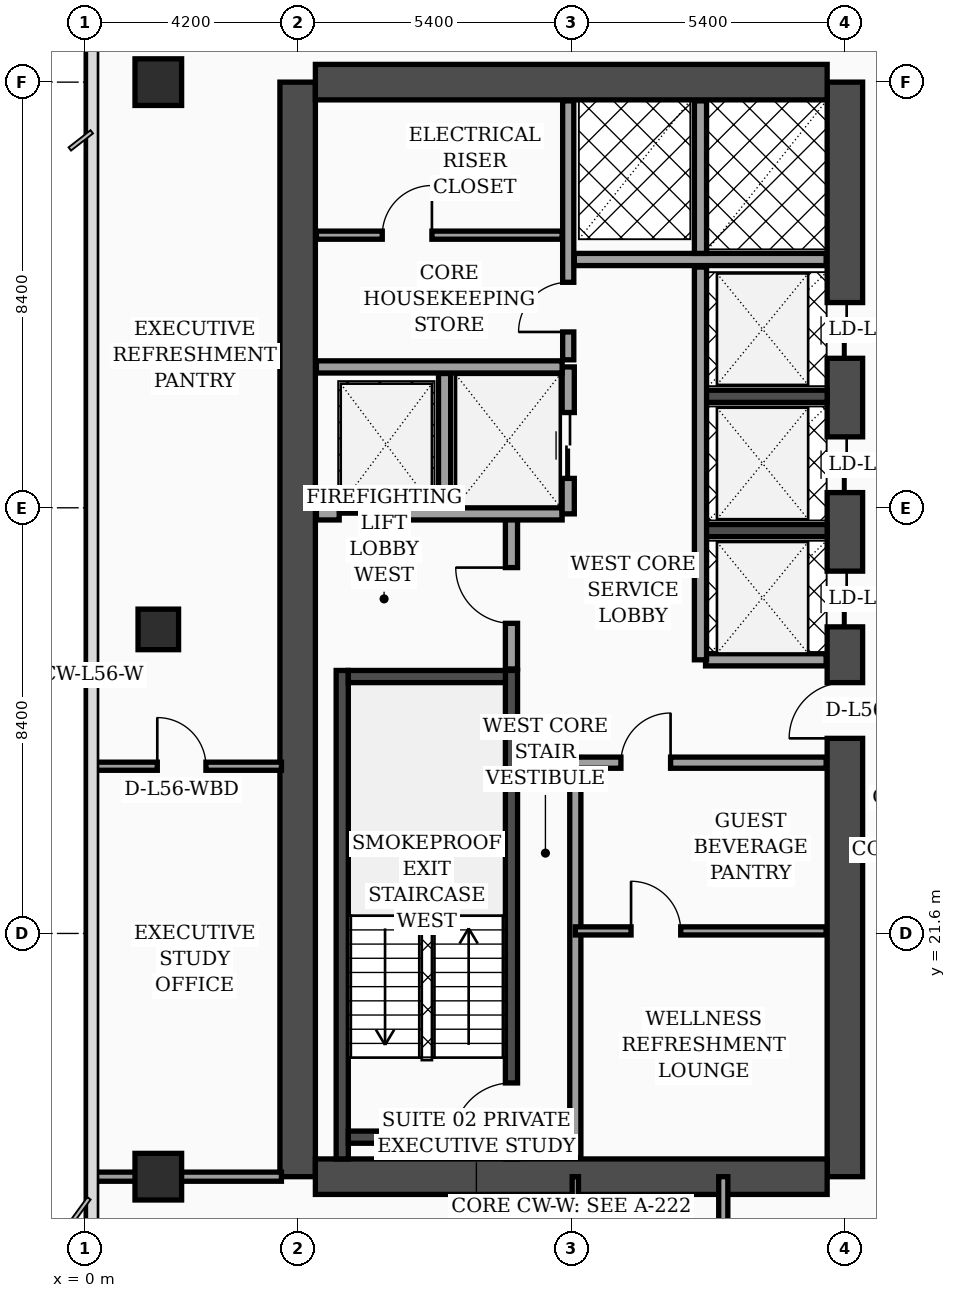
"""IFC4 building model, lengths in metres.
Left out: names, types, materials, properties, quantities, classifications, styles, units other than length and angle.
Written with IfcOpenShell. Run it as: python <this file> out.ifc"""

import sys

from ifc_helpers import new_model, si_unit, direction, frame, frame_2d, origin, origin_2d, place, context, subcontext, project, spatial, rectangle, extrude, element, fill, save


model = new_model("IFC4")
c1 = context("Model", 3, precision=1e-05, world=origin(), true_north=direction((0.0, 1.0)))
c2 = subcontext(c1, "Body", "Model", "MODEL_VIEW")
j1 = project(units=[si_unit("LENGTHUNIT", "METRE"), si_unit("PLANEANGLEUNIT", "RADIAN")], contexts=[c1])
p1 = place(None, origin())
s1 = spatial("IfcSite", under=j1, at=p1, CompositionType="ELEMENT")
p2 = place(p1, origin())
s2 = spatial("IfcBuilding", under=s1, at=p2, CompositionType="ELEMENT")
p3 = place(p2, frame((0.0, 0.0, 226.9)))
s3 = spatial("IfcBuildingStorey", under=s2, at=p3, CompositionType="ELEMENT", Elevation=226.9)
p4 = place(p3, frame((4.2, 16.8, 0.0), z_axis=(0.0, 0.0, 1.0), x_axis=(0.0, 1.0, 0.0)))
e1 = element("IfcWall", 1, at=p4, inside=s3, PredefinedType="SHEAR", context=c2, shape_type="SweptSolid", body=[
    extrude(rectangle(XDim=21.6, YDim=0.7, at=frame_2d((10.8, 0.0))), origin(), (0.0, 0.0, 1.0), 3.56),
])
p5 = place(p3, frame((15.0, 16.8, 0.0), z_axis=(0.0, 0.0, 1.0), x_axis=(0.0, 1.0, 0.0)))
e2 = element("IfcWall", 2, at=p5, inside=s3, PredefinedType="SHEAR", context=c2, shape_type="SweptSolid", body=[
    extrude(rectangle(XDim=21.6, YDim=0.7, at=frame_2d((10.8, 0.0))), origin(), (0.0, 0.0, 1.0), 3.56),
])
p6 = place(p5, frame((8.65, 0.0, 0.0)))
e3 = element("IfcOpeningElement", 3, at=p6, cuts=e2, PredefinedType="OPENING", context=c2, shape_type="SweptSolid", body=[
    extrude(rectangle(XDim=1.1, YDim=2.2, at=frame_2d((0.55, 1.1))), frame((0.0, 0.36, 0.0), z_axis=(0.0, -1.0, 0.0), x_axis=(1.0, 0.0, 0.0)), (0.0, 0.0, 1.0), 0.72),
])
p7 = place(p5, frame((10.85, 0.0, 0.0)))
e4 = element("IfcOpeningElement", 4, at=p7, cuts=e2, PredefinedType="OPENING", context=c2, shape_type="SweptSolid", body=[
    extrude(rectangle(XDim=1.1, YDim=2.2, at=frame_2d((0.55, 1.1))), frame((0.0, 0.36, 0.0), z_axis=(0.0, -1.0, 0.0), x_axis=(1.0, 0.0, 0.0)), (0.0, 0.0, 1.0), 0.72),
])
p8 = place(p5, frame((13.5, 0.0, 0.0)))
e5 = element("IfcOpeningElement", 5, at=p8, cuts=e2, PredefinedType="OPENING", context=c2, shape_type="SweptSolid", body=[
    extrude(rectangle(XDim=1.1, YDim=2.2, at=frame_2d((0.55, 1.1))), frame((0.0, 0.36, 0.0), z_axis=(0.0, -1.0, 0.0), x_axis=(1.0, 0.0, 0.0)), (0.0, 0.0, 1.0), 0.72),
])
p9 = place(p5, frame((16.15, 0.0, 0.0)))
e6 = element("IfcOpeningElement", 6, at=p9, cuts=e2, PredefinedType="OPENING", context=c2, shape_type="SweptSolid", body=[
    extrude(rectangle(XDim=1.1, YDim=2.2, at=frame_2d((0.55, 1.1))), frame((0.0, 0.36, 0.0), z_axis=(0.0, -1.0, 0.0), x_axis=(1.0, 0.0, 0.0)), (0.0, 0.0, 1.0), 0.72),
])
for number, where, z_axis, x_axis in (
    (7, (4.55, 38.4, 0.0), (0.0, 0.0, 1.0), (1.0, 0.0, 0.0)),
    (8, (4.55, 16.8, 0.0), (0.0, 0.0, 1.0), (1.0, 0.0, 0.0)),
):
    element("IfcWall", number, at=place(p3, frame(where, z_axis=z_axis, x_axis=x_axis)), inside=s3, PredefinedType="SHEAR", context=c2, shape_type="SweptSolid", body=[
        extrude(rectangle(XDim=10.1, YDim=0.7, at=frame_2d((5.05, 0.0))), origin(), (0.0, 0.0, 1.0), 3.56),
    ])
p10 = place(p3, frame((5.08, 17.15, 0.0), z_axis=(0.0, 0.0, 1.0), x_axis=(0.0, 1.0, 0.0)))
e9 = element("IfcWall", 9, at=p10, inside=s3, PredefinedType="SOLIDWALL", context=c2, shape_type="SweptSolid", body=[
    extrude(rectangle(XDim=9.64, YDim=0.24, at=frame_2d((4.82, 0.0))), origin(), (0.0, 0.0, 1.0), 3.56),
])
p11 = place(p3, frame((8.42, 17.15, 0.0), z_axis=(0.0, 0.0, 1.0), x_axis=(0.0, 1.0, 0.0)))
e10 = element("IfcWall", 10, at=p11, inside=s3, PredefinedType="SOLIDWALL", context=c2, shape_type="SweptSolid", body=[
    extrude(rectangle(XDim=9.64, YDim=0.24, at=frame_2d((4.82, 0.0))), origin(), (0.0, 0.0, 1.0), 3.56),
])
p12 = place(p11, frame((0.35, 0.0, 0.0)))
e11 = element("IfcOpeningElement", 11, at=p12, cuts=e10, PredefinedType="OPENING", context=c2, shape_type="SweptSolid", body=[
    extrude(rectangle(XDim=1.15, YDim=2.2, at=frame_2d((0.575, 1.1))), frame((0.0, 0.13, 0.0), z_axis=(0.0, -1.0, 0.0), x_axis=(1.0, 0.0, 0.0)), (0.0, 0.0, 1.0), 0.26),
])
for number, where, z_axis, x_axis in (
    (12, (5.2, 17.58, 0.0), (0.0, 0.0, 1.0), (1.0, 0.0, 0.0)),
    (13, (5.2, 26.67, 0.0), (0.0, 0.0, 1.0), (1.0, 0.0, 0.0)),
):
    element("IfcWall", number, at=place(p3, frame(where, z_axis=z_axis, x_axis=x_axis)), inside=s3, PredefinedType="SOLIDWALL", context=c2, shape_type="SweptSolid", body=[
        extrude(rectangle(XDim=3.1, YDim=0.24, at=frame_2d((1.55, 0.0))), origin(), (0.0, 0.0, 1.0), 3.56),
    ])
for number, where, z_axis, x_axis in (
    (14, (12.18, 29.55, 0.0), (0.0, 0.0, 1.0), (1.0, 0.0, 0.0)),
    (15, (12.18, 32.2, 0.0), (0.0, 0.0, 1.0), (1.0, 0.0, 0.0)),
):
    element("IfcWall", number, at=place(p3, frame(where, z_axis=z_axis, x_axis=x_axis)), inside=s3, PredefinedType="SOLIDWALL", context=c2, shape_type="SweptSolid", body=[
        extrude(rectangle(XDim=2.47, YDim=0.24, at=frame_2d((1.235, 0.0))), origin(), (0.0, 0.0, 1.0), 3.56),
    ])
p13 = place(p3, frame((1.45, 16.8, 0.0), z_axis=(0.0, 0.0, 1.0), x_axis=(1.0, 0.0, 0.0)))
e16 = element("IfcColumn", 16, at=p13, inside=s3, PredefinedType="COLUMN", context=c2, shape_type="SweptSolid", body=[
    extrude(rectangle(XDim=0.92, YDim=0.92, at=origin_2d()), origin(), (0.0, 0.0, 1.0), 3.56),
])
p14 = place(p3, frame((1.45, 27.6, 0.0), z_axis=(0.0, 0.0, 1.0), x_axis=(1.0, 0.0, 0.0)))
e17 = element("IfcColumn", 17, at=p14, inside=s3, PredefinedType="COLUMN", context=c2, shape_type="SweptSolid", body=[
    extrude(rectangle(XDim=0.8, YDim=0.8, at=origin_2d()), origin(), (0.0, 0.0, 1.0), 3.56),
])
p15 = place(p3, frame((1.45, 38.4, 0.0), z_axis=(0.0, 0.0, 1.0), x_axis=(1.0, 0.0, 0.0)))
e18 = element("IfcColumn", 18, at=p15, inside=s3, PredefinedType="COLUMN", context=c2, shape_type="SweptSolid", body=[
    extrude(rectangle(XDim=0.92, YDim=0.92, at=origin_2d()), origin(), (0.0, 0.0, 1.0), 3.56),
])
p16 = place(p3, frame((8.42, 26.82, 0.0), z_axis=(0.0, 0.0, 1.0), x_axis=(0.0, 1.0, 0.0)))
e19 = element("IfcWall", 19, at=p16, inside=s3, PredefinedType="SOLIDWALL", context=c2, shape_type="SweptSolid", body=[
    extrude(rectangle(XDim=3.0, YDim=0.24, at=frame_2d((1.5, 0.0))), origin(), (0.0, 0.0, 1.0), 3.56),
])
p17 = place(p16, frame((0.9, 0.0, 0.0)))
e20 = element("IfcOpeningElement", 20, at=p17, cuts=e19, PredefinedType="OPENING", context=c2, shape_type="SweptSolid", body=[
    extrude(rectangle(XDim=1.1, YDim=2.2, at=frame_2d((0.55, 1.1))), frame((0.0, 0.13, 0.0), z_axis=(0.0, -1.0, 0.0), x_axis=(1.0, 0.0, 0.0)), (0.0, 0.0, 1.0), 0.26),
])
p18 = place(p3, frame((4.57, 29.88, 0.0), z_axis=(0.0, 0.0, 1.0), x_axis=(1.0, 0.0, 0.0)))
e21 = element("IfcWall", 21, at=p18, inside=s3, PredefinedType="SOLIDWALL", context=c2, shape_type="SweptSolid", body=[
    extrude(rectangle(XDim=4.85, YDim=0.24, at=frame_2d((2.425, 0.0))), origin(), (0.0, 0.0, 1.0), 3.56),
])
p19 = place(p18, frame((0.45, 0.0, 0.0)))
e22 = element("IfcOpeningElement", 22, at=p19, cuts=e21, PredefinedType="OPENING", context=c2, shape_type="SweptSolid", body=[
    extrude(rectangle(XDim=1.3, YDim=2.35, at=frame_2d((0.65, 1.175))), frame((0.0, 0.13, 0.0), z_axis=(0.0, -1.0, 0.0), x_axis=(1.0, 0.0, 0.0)), (0.0, 0.0, 1.0), 0.26),
])
p20 = place(p3, frame((7.1, 30.02, 0.0), z_axis=(0.0, 0.0, 1.0), x_axis=(0.0, 1.0, 0.0)))
e23 = element("IfcWall", 23, at=p20, inside=s3, PredefinedType="SOLIDWALL", context=c2, shape_type="SweptSolid", body=[
    extrude(rectangle(XDim=2.63, YDim=0.24, at=frame_2d((1.315, 0.0))), origin(), (0.0, 0.0, 1.0), 3.56),
])
p21 = place(p3, frame((9.54, 29.88, 0.0), z_axis=(0.0, 0.0, 1.0), x_axis=(0.0, 1.0, 0.0)))
e24 = element("IfcWall", 24, at=p21, inside=s3, PredefinedType="SOLIDWALL", context=c2, shape_type="SweptSolid", body=[
    extrude(rectangle(XDim=2.9, YDim=0.24, at=frame_2d((1.45, 0.0))), origin(), (0.0, 0.0, 1.0), 3.56),
])
p22 = place(p21, frame((0.7, 0.0, 0.0)))
e25 = element("IfcOpeningElement", 25, at=p22, cuts=e24, PredefinedType="OPENING", context=c2, shape_type="SweptSolid", body=[
    extrude(rectangle(XDim=1.3, YDim=2.35, at=frame_2d((0.65, 1.175))), frame((0.0, 0.13, 0.0), z_axis=(0.0, -1.0, 0.0), x_axis=(1.0, 0.0, 0.0)), (0.0, 0.0, 1.0), 0.26),
])
p23 = place(p3, frame((4.57, 32.78, 0.0), z_axis=(0.0, 0.0, 1.0), x_axis=(1.0, 0.0, 0.0)))
e26 = element("IfcWall", 26, at=p23, inside=s3, PredefinedType="SOLIDWALL", context=c2, shape_type="SweptSolid", body=[
    extrude(rectangle(XDim=4.85, YDim=0.24, at=frame_2d((2.425, 0.0))), origin(), (0.0, 0.0, 1.0), 3.19),
])
p24 = place(p3, frame((9.68, 17.17, 0.0), z_axis=(0.0, 0.0, 1.0), x_axis=(0.0, 1.0, 0.0)))
e27 = element("IfcWall", 27, at=p24, inside=s3, PredefinedType="SOLIDWALL", context=c2, shape_type="SweptSolid", body=[
    extrude(rectangle(XDim=7.83, YDim=0.22, at=frame_2d((3.915, 0.0))), origin(), (0.0, 0.0, 1.0), 3.56),
])
p25 = place(p3, frame((4.57, 35.38, 0.0), z_axis=(0.0, 0.0, 1.0), x_axis=(1.0, 0.0, 0.0)))
e28 = element("IfcWall", 28, at=p25, inside=s3, PredefinedType="PARTITIONING", context=c2, shape_type="SweptSolid", body=[
    extrude(rectangle(XDim=4.85, YDim=0.16, at=frame_2d((2.425, 0.0))), origin(), (0.0, 0.0, 1.0), 3.56),
])
p26 = place(p25, frame((1.3, 0.0, 0.0)))
e29 = element("IfcOpeningElement", 29, at=p26, cuts=e28, PredefinedType="OPENING", context=c2, shape_type="SweptSolid", body=[
    extrude(rectangle(XDim=0.98, YDim=2.15, at=frame_2d((0.49, 1.075))), frame((0.0, 0.09, 0.0), z_axis=(0.0, -1.0, 0.0), x_axis=(1.0, 0.0, 0.0)), (0.0, 0.0, 1.0), 0.18),
])
p27 = place(p3, frame((9.54, 32.92, 0.0), z_axis=(0.0, 0.0, 1.0), x_axis=(0.0, 1.0, 0.0)))
e30 = element("IfcWall", 30, at=p27, inside=s3, PredefinedType="SOLIDWALL", context=c2, shape_type="SweptSolid", body=[
    extrude(rectangle(XDim=5.11, YDim=0.22, at=frame_2d((2.555, 0.0))), origin(), (0.0, 0.0, 1.0), 3.56),
])
p28 = place(p27, frame((0.55, 0.0, 0.0)))
e31 = element("IfcOpeningElement", 31, at=p28, cuts=e30, PredefinedType="OPENING", context=c2, shape_type="SweptSolid", body=[
    extrude(rectangle(XDim=0.98, YDim=2.15, at=frame_2d((0.49, 1.075))), frame((0.0, 0.12, 0.0), z_axis=(0.0, -1.0, 0.0), x_axis=(1.0, 0.0, 0.0)), (0.0, 0.0, 1.0), 0.24),
])
p29 = place(p3, frame((9.68, 21.65, 0.0), z_axis=(0.0, 0.0, 1.0), x_axis=(1.0, 0.0, 0.0)))
e32 = element("IfcWall", 32, at=p29, inside=s3, PredefinedType="PARTITIONING", context=c2, shape_type="SweptSolid", body=[
    extrude(rectangle(XDim=4.95, YDim=0.16, at=frame_2d((2.475, 0.0))), origin(), (0.0, 0.0, 1.0), 3.09),
])
p30 = place(p29, frame((1.1, 0.0, 0.0)))
e33 = element("IfcOpeningElement", 33, at=p30, cuts=e32, PredefinedType="OPENING", context=c2, shape_type="SweptSolid", body=[
    extrude(rectangle(XDim=0.98, YDim=2.15, at=frame_2d((0.49, 1.075))), frame((0.0, 0.09, 0.0), z_axis=(0.0, -1.0, 0.0), x_axis=(1.0, 0.0, 0.0)), (0.0, 0.0, 1.0), 0.18),
])
p31 = place(p3, frame((9.68, 24.97, 0.0), z_axis=(0.0, 0.0, 1.0), x_axis=(1.0, 0.0, 0.0)))
e34 = element("IfcWall", 34, at=p31, inside=s3, PredefinedType="SOLIDWALL", context=c2, shape_type="SweptSolid", body=[
    extrude(rectangle(XDim=4.95, YDim=0.22, at=frame_2d((2.475, 0.0))), origin(), (0.0, 0.0, 1.0), 2.94),
])
p32 = place(p31, frame((0.9, 0.0, 0.0)))
e35 = element("IfcOpeningElement", 35, at=p32, cuts=e34, PredefinedType="OPENING", context=c2, shape_type="SweptSolid", body=[
    extrude(rectangle(XDim=0.98, YDim=2.15, at=frame_2d((0.49, 1.075))), frame((0.0, 0.12, 0.0), z_axis=(0.0, -1.0, 0.0), x_axis=(1.0, 0.0, 0.0)), (0.0, 0.0, 1.0), 0.24),
])
p33 = place(p3, frame((12.25, 27.0, 0.0), z_axis=(0.0, 0.0, 1.0), x_axis=(1.0, 0.0, 0.0)))
e36 = element("IfcWall", 36, at=p33, inside=s3, PredefinedType="SOLIDWALL", context=c2, shape_type="SweptSolid", body=[
    extrude(rectangle(XDim=2.38, YDim=0.24, at=frame_2d((1.19, 0.0))), origin(), (0.0, 0.0, 1.0), 3.56),
])
p34 = place(p3, frame((12.15, 27.0, 0.0), z_axis=(0.0, 0.0, 1.0), x_axis=(0.0, 1.0, 0.0)))
e37 = element("IfcWall", 37, at=p34, inside=s3, PredefinedType="SOLIDWALL", context=c2, shape_type="SweptSolid", body=[
    extrude(rectangle(XDim=7.75, YDim=0.24, at=frame_2d((3.875, 0.0))), origin(), (0.0, 0.0, 1.0), 3.56),
])
p35 = place(p3, frame((9.66, 34.9, 0.0), z_axis=(0.0, 0.0, 1.0), x_axis=(1.0, 0.0, 0.0)))
e38 = element("IfcWall", 38, at=p35, inside=s3, PredefinedType="SOLIDWALL", context=c2, shape_type="SweptSolid", body=[
    extrude(rectangle(XDim=4.97, YDim=0.24, at=frame_2d((2.485, 0.0))), origin(), (0.0, 0.0, 1.0), 3.56),
])
p36 = place(p3, frame((12.15, 35.02, 0.0), z_axis=(0.0, 0.0, 1.0), x_axis=(0.0, 1.0, 0.0)))
e39 = element("IfcWall", 39, at=p36, inside=s3, PredefinedType="SOLIDWALL", context=c2, shape_type="SweptSolid", body=[
    extrude(rectangle(XDim=3.01, YDim=0.24, at=frame_2d((1.505, 0.0))), origin(), (0.0, 0.0, 1.0), 3.56),
])
p37 = place(p3, frame((0.08, 24.9, 0.0), z_axis=(0.0, 0.0, 1.0), x_axis=(1.0, 0.0, 0.0)))
e40 = element("IfcWall", 40, at=p37, inside=s3, PredefinedType="PARTITIONING", context=c2, shape_type="SweptSolid", body=[
    extrude(rectangle(XDim=3.8, YDim=0.16, at=frame_2d((1.9, 0.0))), origin(), (0.0, 0.0, 1.0), 3.09),
])
p38 = place(p37, frame((1.35, 0.0, 0.0)))
e41 = element("IfcOpeningElement", 41, at=p38, cuts=e40, PredefinedType="OPENING", context=c2, shape_type="SweptSolid", body=[
    extrude(rectangle(XDim=0.96, YDim=2.2, at=frame_2d((0.48, 1.1))), frame((0.0, 0.09, 0.0), z_axis=(0.0, -1.0, 0.0), x_axis=(1.0, 0.0, 0.0)), (0.0, 0.0, 1.0), 0.18),
])
p39 = place(p3, frame((0.08, 16.8, 0.0), z_axis=(0.0, 0.0, 1.0), x_axis=(1.0, 0.0, 0.0)))
e42 = element("IfcWall", 42, at=p39, inside=s3, PredefinedType="PARTITIONING", context=c2, shape_type="SweptSolid", body=[
    extrude(rectangle(XDim=3.8, YDim=0.18, at=frame_2d((1.9, 0.0))), origin(), (0.0, 0.0, 1.0), 2.94),
])
p40 = place(p3, frame((9.68, 14.75, 0.0), z_axis=(0.0, 0.0, 1.0), x_axis=(0.0, 1.0, 0.0)))
e43 = element("IfcWall", 43, at=p40, inside=s3, PredefinedType="PARTITIONING", context=c2, shape_type="SweptSolid", body=[
    extrude(rectangle(XDim=2.05, YDim=0.125, at=frame_2d((1.025, 0.0))), origin(), (0.0, 0.0, 1.0), 3.56),
])
p41 = place(p3, frame((12.6, 2.44, 0.0), z_axis=(0.0, 0.0, 1.0), x_axis=(0.0, 1.0, 0.0)))
e44 = element("IfcWall", 44, at=p41, inside=s3, PredefinedType="PARTITIONING", context=c2, shape_type="SweptSolid", body=[
    extrude(rectangle(XDim=14.36, YDim=0.18, at=frame_2d((7.18, 0.0))), origin(), (0.0, 0.0, 1.0), 2.94),
])
p42 = place(p41, frame((3.01, 0.0, 0.0)))
e45 = element("IfcOpeningElement", 45, at=p42, cuts=e44, PredefinedType="OPENING", context=c2, shape_type="SweptSolid", body=[
    extrude(rectangle(XDim=1.02, YDim=2.2, at=frame_2d((0.51, 1.1))), frame((0.0, 0.1, 0.0), z_axis=(0.0, -1.0, 0.0), x_axis=(1.0, 0.0, 0.0)), (0.0, 0.0, 1.0), 0.2),
])
p43 = place(p41, frame((10.1, 0.0, 0.0)))
e46 = element("IfcOpeningElement", 46, at=p43, cuts=e44, PredefinedType="OPENING", context=c2, shape_type="SweptSolid", body=[
    extrude(rectangle(XDim=1.02, YDim=2.2, at=frame_2d((0.51, 1.1))), frame((0.0, 0.1, 0.0), z_axis=(0.0, -1.0, 0.0), x_axis=(1.0, 0.0, 0.0)), (0.0, 0.0, 1.0), 0.2),
])
p44 = place(p17, origin())
e47 = element("IfcDoor", 47, at=p44, inside=s3, OperationType="SINGLE_SWING_RIGHT", PredefinedType="DOOR", context=c2, shape_type="SweptSolid", body=[
    extrude(rectangle(XDim=1.1, YDim=2.2, at=frame_2d((0.55, 1.1))), frame((0.0, 0.025, 0.0), z_axis=(0.0, -1.0, 0.0), x_axis=(1.0, 0.0, 0.0)), (0.0, 0.0, 1.0), 0.05),
])
fill(e20, e47)
p45 = place(p19, origin())
e48 = element("IfcDoor", 48, at=p45, inside=s3, OperationType="DOUBLE_DOOR_SLIDING", PredefinedType="DOOR", context=c2, shape_type="SweptSolid", body=[
    extrude(rectangle(XDim=1.3, YDim=2.35, at=frame_2d((0.65, 1.175))), frame((0.0, 0.025, 0.0), z_axis=(0.0, -1.0, 0.0), x_axis=(1.0, 0.0, 0.0)), (0.0, 0.0, 1.0), 0.05),
])
fill(e22, e48)
p46 = place(p22, origin())
e49 = element("IfcDoor", 49, at=p46, inside=s3, OperationType="DOUBLE_DOOR_SLIDING", PredefinedType="DOOR", context=c2, shape_type="SweptSolid", body=[
    extrude(rectangle(XDim=1.3, YDim=2.35, at=frame_2d((0.65, 1.175))), frame((0.0, 0.025, 0.0), z_axis=(0.0, -1.0, 0.0), x_axis=(1.0, 0.0, 0.0)), (0.0, 0.0, 1.0), 0.05),
])
fill(e25, e49)
p47 = place(p26, origin())
e50 = element("IfcDoor", 50, at=p47, inside=s3, OperationType="SINGLE_SWING_RIGHT", PredefinedType="DOOR", context=c2, shape_type="SweptSolid", body=[
    extrude(rectangle(XDim=0.98, YDim=2.15, at=frame_2d((0.49, 1.075))), frame((0.0, 0.025, 0.0), z_axis=(0.0, -1.0, 0.0), x_axis=(1.0, 0.0, 0.0)), (0.0, 0.0, 1.0), 0.05),
])
fill(e29, e50)
p48 = place(p28, origin())
e51 = element("IfcDoor", 51, at=p48, inside=s3, OperationType="SINGLE_SWING_LEFT", PredefinedType="DOOR", context=c2, shape_type="SweptSolid", body=[
    extrude(rectangle(XDim=0.98, YDim=2.15, at=frame_2d((0.49, 1.075))), frame((0.0, 0.025, 0.0), z_axis=(0.0, -1.0, 0.0), x_axis=(1.0, 0.0, 0.0)), (0.0, 0.0, 1.0), 0.05),
])
fill(e31, e51)
p49 = place(p30, origin())
e52 = element("IfcDoor", 52, at=p49, inside=s3, OperationType="SINGLE_SWING_LEFT", PredefinedType="DOOR", context=c2, shape_type="SweptSolid", body=[
    extrude(rectangle(XDim=0.98, YDim=2.15, at=frame_2d((0.49, 1.075))), frame((0.0, 0.025, 0.0), z_axis=(0.0, -1.0, 0.0), x_axis=(1.0, 0.0, 0.0)), (0.0, 0.0, 1.0), 0.05),
])
fill(e33, e52)
p50 = place(p32, origin())
e53 = element("IfcDoor", 53, at=p50, inside=s3, OperationType="SINGLE_SWING_RIGHT", PredefinedType="DOOR", context=c2, shape_type="SweptSolid", body=[
    extrude(rectangle(XDim=0.98, YDim=2.15, at=frame_2d((0.49, 1.075))), frame((0.0, 0.025, 0.0), z_axis=(0.0, -1.0, 0.0), x_axis=(1.0, 0.0, 0.0)), (0.0, 0.0, 1.0), 0.05),
])
fill(e35, e53)
p51 = place(p38, origin())
e54 = element("IfcDoor", 54, at=p51, inside=s3, OperationType="SINGLE_SWING_LEFT", PredefinedType="DOOR", context=c2, shape_type="SweptSolid", body=[
    extrude(rectangle(XDim=0.96, YDim=2.2, at=frame_2d((0.48, 1.1))), frame((0.0, 0.025, 0.0), z_axis=(0.0, -1.0, 0.0), x_axis=(1.0, 0.0, 0.0)), (0.0, 0.0, 1.0), 0.05),
])
fill(e41, e54)
p52 = place(p12, origin())
e55 = element("IfcDoor", 55, at=p52, inside=s3, OperationType="SINGLE_SWING_LEFT", PredefinedType="DOOR", context=c2, shape_type="SweptSolid", body=[
    extrude(rectangle(XDim=1.15, YDim=2.2, at=frame_2d((0.575, 1.1))), frame((0.0, 0.025, 0.0), z_axis=(0.0, -1.0, 0.0), x_axis=(1.0, 0.0, 0.0)), (0.0, 0.0, 1.0), 0.05),
])
fill(e11, e55)
p53 = place(p6, origin())
e56 = element("IfcDoor", 56, at=p53, inside=s3, OperationType="SINGLE_SWING_LEFT", PredefinedType="DOOR", context=c2, shape_type="SweptSolid", body=[
    extrude(rectangle(XDim=1.1, YDim=2.2, at=frame_2d((0.55, 1.1))), frame((0.0, 0.025, 0.0), z_axis=(0.0, -1.0, 0.0), x_axis=(1.0, 0.0, 0.0)), (0.0, 0.0, 1.0), 0.05),
])
fill(e3, e56)
p54 = place(p7, origin())
e57 = element("IfcDoor", 57, at=p54, inside=s3, OperationType="DOUBLE_DOOR_SLIDING", PredefinedType="DOOR", context=c2, shape_type="SweptSolid", body=[
    extrude(rectangle(XDim=1.1, YDim=2.2, at=frame_2d((0.55, 1.1))), frame((0.0, 0.025, 0.0), z_axis=(0.0, -1.0, 0.0), x_axis=(1.0, 0.0, 0.0)), (0.0, 0.0, 1.0), 0.05),
])
fill(e4, e57)
p55 = place(p8, origin())
e58 = element("IfcDoor", 58, at=p55, inside=s3, OperationType="DOUBLE_DOOR_SLIDING", PredefinedType="DOOR", context=c2, shape_type="SweptSolid", body=[
    extrude(rectangle(XDim=1.1, YDim=2.2, at=frame_2d((0.55, 1.1))), frame((0.0, 0.025, 0.0), z_axis=(0.0, -1.0, 0.0), x_axis=(1.0, 0.0, 0.0)), (0.0, 0.0, 1.0), 0.05),
])
fill(e5, e58)
p56 = place(p9, origin())
e59 = element("IfcDoor", 59, at=p56, inside=s3, OperationType="DOUBLE_DOOR_SLIDING", PredefinedType="DOOR", context=c2, shape_type="SweptSolid", body=[
    extrude(rectangle(XDim=1.1, YDim=2.2, at=frame_2d((0.55, 1.1))), frame((0.0, 0.025, 0.0), z_axis=(0.0, -1.0, 0.0), x_axis=(1.0, 0.0, 0.0)), (0.0, 0.0, 1.0), 0.05),
])
fill(e6, e59)
save(model, sys.argv[1])
